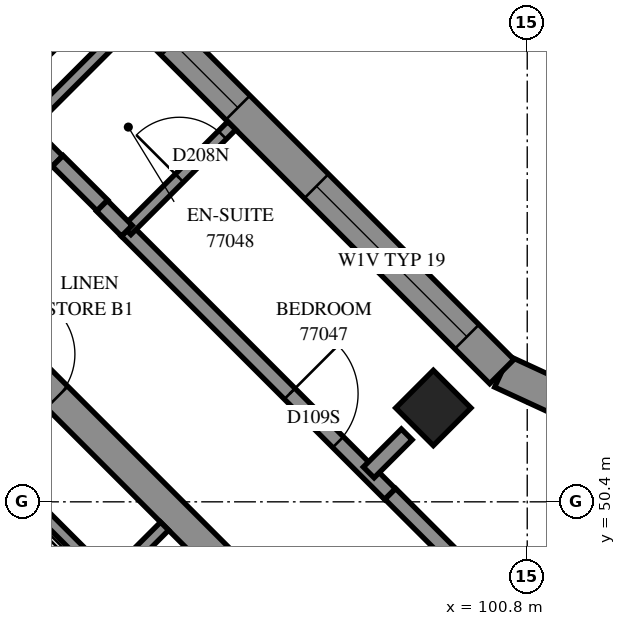
"""IFC4 building model, lengths in metres.
Left out: names, types, materials, properties, quantities, classifications, styles, units other than length and angle.
Written with IfcOpenShell. Run it as: python <this file> out.ifc"""

import sys

from ifc_helpers import new_model, si_unit, direction, frame, frame_2d, origin, origin_2d, place, context, subcontext, project, spatial, polyline, rectangle, outline, extrude, element, fill, save


model = new_model("IFC4")
c1 = context("Model", 3, precision=1e-05, world=origin(), true_north=direction((0.0, 1.0)))
c2 = subcontext(c1, "Body", "Model", "MODEL_VIEW")
j1 = project(units=[si_unit("LENGTHUNIT", "METRE"), si_unit("PLANEANGLEUNIT", "RADIAN")], contexts=[c1])
p1 = place(None, origin())
s1 = spatial("IfcSite", under=j1, at=p1, CompositionType="ELEMENT")
p2 = place(p1, origin())
s2 = spatial("IfcBuilding", under=s1, at=p2, CompositionType="ELEMENT")
p3 = place(p2, frame((0.0, 0.0, 281.2)))
s3 = spatial("IfcBuildingStorey", under=s2, at=p3, CompositionType="ELEMENT", Elevation=281.2)
for number, where, z_axis, x_axis in (
    (1, (94.474, 56.727, 0.0), (0.0, 0.0, 1.0), (0.707, -0.707, 0.0)),
    (2, (99.565, 51.635, 0.0), (0.0, 0.0, 1.0), (0.707, -0.707, 0.0)),
):
    element("IfcColumn", number, at=place(p3, frame(where, z_axis=z_axis, x_axis=x_axis)), inside=s3, PredefinedType="COLUMN", context=c2, shape_type="SweptSolid", body=[
        extrude(rectangle(XDim=0.7, YDim=0.7, at=origin_2d()), origin(), (0.0, 0.0, 1.0), 3.1),
    ])
p4 = place(p3, frame((86.695, 59.696, -0.3), z_axis=(0.0, 0.0, 1.0), x_axis=(0.7071100706, -0.7071034917, 0.0)))
e3 = element("IfcWall", 3, at=p4, inside=s3, PredefinedType="SHEAR", context=c2, shape_type="SweptSolid", body=[
    extrude(rectangle(XDim=15.2, YDim=0.4, at=frame_2d((7.6, 0.0))), origin(), (0.0, 0.0, 1.0), 2.7),
])
p5 = place(p4, frame((10.4, 0.0, 0.3)))
e4 = element("IfcOpeningElement", 4, at=p5, cuts=e3, PredefinedType="OPENING", context=c2, shape_type="SweptSolid", body=[
    extrude(rectangle(XDim=0.8, YDim=2.1, at=frame_2d((0.4, 1.05))), frame((0.0, 0.21, 0.0), z_axis=(0.0, -1.0, 0.0), x_axis=(1.0, 0.0, 0.0)), (0.0, 0.0, 1.0), 0.42),
])
p6 = place(p3, frame((99.246, 46.544, 0.0), z_axis=(0.0, 0.0, 1.0), x_axis=(0.7071067812, 0.7071067812, 0.0)))
e5 = element("IfcWall", 5, at=p6, inside=s3, PredefinedType="SOLIDWALL", context=c2, shape_type="SweptSolid", body=[
    extrude(outline(polyline([(0.225, -0.225), (6.255, -0.225), (5.61, 0.225), (-0.225, 0.225), (0.225, -0.225)])), origin(), (0.0, 0.0, 1.0), 3.1),
])
p7 = place(p6, frame((0.713, 0.0, 0.6)))
e6 = element("IfcOpeningElement", 6, at=p7, cuts=e5, PredefinedType="OPENING", context=c2, shape_type="SweptSolid", body=[
    extrude(rectangle(XDim=1.8, YDim=1.9, at=frame_2d((0.9, 0.95))), frame((0.0, 0.235, 0.0), z_axis=(0.0, -1.0, 0.0), x_axis=(1.0, 0.0, 0.0)), (0.0, 0.0, 1.0), 0.47),
])
p8 = place(p6, frame((4.017, 0.0, 0.6)))
e7 = element("IfcOpeningElement", 7, at=p8, cuts=e5, PredefinedType="OPENING", context=c2, shape_type="SweptSolid", body=[
    extrude(rectangle(XDim=1.2, YDim=1.9, at=frame_2d((0.6, 0.95))), frame((0.0, 0.235, 0.0), z_axis=(0.0, -1.0, 0.0), x_axis=(1.0, 0.0, 0.0)), (0.0, 0.0, 1.0), 0.47),
])
p9 = place(p3, frame((103.441, 50.739, 0.0), z_axis=(0.0, 0.0, 1.0), x_axis=(-0.9078548817, 0.419284526, 0.0)))
e8 = element("IfcWall", 8, at=p9, inside=s3, PredefinedType="SOLIDWALL", context=c2, shape_type="SweptSolid", body=[
    extrude(outline(polyline([(-0.323, -0.225), (3.238, -0.225), (3.318, 0.225), (0.323, 0.225), (-0.323, -0.225)])), origin(), (0.0, 0.0, 1.0), 3.1),
])
p10 = place(p9, frame((1.2, 0.0, 0.45)))
e9 = element("IfcOpeningElement", 9, at=p10, cuts=e8, PredefinedType="OPENING", context=c2, shape_type="SweptSolid", body=[
    extrude(rectangle(XDim=1.2, YDim=2.55, at=frame_2d((0.6, 1.275))), frame((0.0, 0.235, 0.0), z_axis=(0.0, -1.0, 0.0), x_axis=(1.0, 0.0, 0.0)), (0.0, 0.0, 1.0), 0.47),
])
p11 = place(p3, frame((100.466, 52.113, 0.0), z_axis=(0.0, 0.0, 1.0), x_axis=(-0.7071067812, 0.7071067812, 0.0)))
e10 = element("IfcWall", 10, at=p11, inside=s3, PredefinedType="SOLIDWALL", context=c2, shape_type="SweptSolid", body=[
    extrude(outline(polyline([(0.04, -0.225), (6.722, -0.225), (6.722, 0.225), (-0.04, 0.225), (0.04, -0.225)])), origin(), (0.0, 0.0, 1.0), 3.1),
])
p12 = place(p11, frame((0.649, 0.0, 0.45)))
e11 = element("IfcOpeningElement", 11, at=p12, cuts=e10, PredefinedType="OPENING", context=c2, shape_type="SweptSolid", body=[
    extrude(rectangle(XDim=2.8, YDim=2.55, at=frame_2d((1.4, 1.275))), frame((0.0, 0.235, 0.0), z_axis=(0.0, -1.0, 0.0), x_axis=(1.0, 0.0, 0.0)), (0.0, 0.0, 1.0), 0.47),
])
p13 = place(p11, frame((4.911, 0.0, 0.45)))
e12 = element("IfcOpeningElement", 12, at=p13, cuts=e10, PredefinedType="OPENING", context=c2, shape_type="SweptSolid", body=[
    extrude(rectangle(XDim=1.2, YDim=2.55, at=frame_2d((0.6, 1.275))), frame((0.0, 0.235, 0.0), z_axis=(0.0, -1.0, 0.0), x_axis=(1.0, 0.0, 0.0)), (0.0, 0.0, 1.0), 0.47),
])
p14 = place(p3, frame((91.313, 53.354, 0.0), z_axis=(0.0, 0.0, 1.0), x_axis=(0.7071067812, -0.7071067812, 0.0)))
e13 = element("IfcWall", 13, at=p14, inside=s3, PredefinedType="PARTITIONING", context=c2, shape_type="SweptSolid", body=[
    extrude(rectangle(XDim=5.65, YDim=0.15, at=frame_2d((2.825, 0.0))), origin(), (0.0, 0.0, 1.0), 3.1),
])
p15 = place(p3, frame((95.308, 49.358, 0.0), z_axis=(0.0, 0.0, 1.0), x_axis=(0.70705776, 0.707155799, 0.0)))
e14 = element("IfcWall", 14, at=p15, inside=s3, PredefinedType="PARTITIONING", context=c2, shape_type="SweptSolid", body=[
    extrude(rectangle(XDim=1.02, YDim=0.15, at=frame_2d((0.51, 0.0))), origin(), (0.0, 0.0, 1.0), 3.1),
])
p16 = place(p3, frame((91.077, 58.421, 0.0), z_axis=(0.0, 0.0, 1.0), x_axis=(0.7069869563, -0.7072265858, 0.0)))
e15 = element("IfcWall", 15, at=p16, inside=s3, PredefinedType="PARTITIONING", context=c2, shape_type="SweptSolid", body=[
    extrude(rectangle(XDim=5.008, YDim=0.2, at=frame_2d((2.504, 0.0))), origin(), (0.0, 0.0, 1.0), 3.1),
])
p17 = place(p16, frame((2.132, 0.0, 0.0)))
e16 = element("IfcOpeningElement", 16, at=p17, cuts=e15, PredefinedType="OPENING", context=c2, shape_type="SweptSolid", body=[
    extrude(rectangle(XDim=0.9, YDim=2.1, at=frame_2d((0.45, 1.05))), frame((0.0, 0.11, 0.0), z_axis=(0.0, -1.0, 0.0), x_axis=(1.0, 0.0, 0.0)), (0.0, 0.0, 1.0), 0.22),
])
p18 = place(p3, frame((95.531, 53.965, 0.0), z_axis=(0.0, 0.0, 1.0), x_axis=(0.7071067812, -0.7071067812, 0.0)))
e17 = element("IfcWall", 17, at=p18, inside=s3, PredefinedType="PARTITIONING", context=c2, shape_type="SweptSolid", body=[
    extrude(rectangle(XDim=4.899, YDim=0.2, at=frame_2d((2.449, 0.0))), origin(), (0.0, 0.0, 1.0), 3.1),
])
p19 = place(p18, frame((3.031, 0.0, 0.0)))
e18 = element("IfcOpeningElement", 18, at=p19, cuts=e17, PredefinedType="OPENING", context=c2, shape_type="SweptSolid", body=[
    extrude(rectangle(XDim=0.9, YDim=2.1, at=frame_2d((0.45, 1.05))), frame((0.0, 0.11, 0.0), z_axis=(0.0, -1.0, 0.0), x_axis=(1.0, 0.0, 0.0)), (0.0, 0.0, 1.0), 0.22),
])
p20 = place(p3, frame((98.998, 50.504, 0.0), z_axis=(0.0, 0.0, 1.0), x_axis=(0.7076063266, -0.7066068826, 0.0)))
e19 = element("IfcWall", 19, at=p20, inside=s3, PredefinedType="PARTITIONING", context=c2, shape_type="SweptSolid", body=[
    extrude(rectangle(XDim=2.001, YDim=0.2, at=frame_2d((1.001, 0.0))), origin(), (0.0, 0.0, 1.0), 3.1),
])
p21 = place(p3, frame((94.189, 55.313, 0.0), z_axis=(0.0, 0.0, 1.0), x_axis=(0.7070811488, 0.7071324126, 0.0)))
e20 = element("IfcWall", 20, at=p21, inside=s3, PredefinedType="PARTITIONING", context=c2, shape_type="SweptSolid", body=[
    extrude(rectangle(XDim=1.951, YDim=0.15, at=frame_2d((0.975, 0.0))), origin(), (0.0, 0.0, 1.0), 3.1),
])
p22 = place(p3, frame((95.533, 53.969, 0.0), z_axis=(0.0, 0.0, 1.0), x_axis=(0.7070811488, 0.7071324126, 0.0)))
e21 = element("IfcWall", 21, at=p22, inside=s3, PredefinedType="PARTITIONING", context=c2, shape_type="SweptSolid", body=[
    extrude(rectangle(XDim=1.951, YDim=0.15, at=frame_2d((0.975, 0.0))), origin(), (0.0, 0.0, 1.0), 3.1),
])
p23 = place(p22, frame((0.976, 0.0, 0.0)))
e22 = element("IfcOpeningElement", 22, at=p23, cuts=e21, PredefinedType="OPENING", context=c2, shape_type="SweptSolid", body=[
    extrude(rectangle(XDim=0.8, YDim=2.1, at=frame_2d((0.4, 1.05))), frame((0.0, 0.085, 0.0), z_axis=(0.0, -1.0, 0.0), x_axis=(1.0, 0.0, 0.0)), (0.0, 0.0, 1.0), 0.17),
])
p24 = place(p3, frame((94.623, 54.885, 0.0), z_axis=(0.0, 0.0, 1.0), x_axis=(0.7083103646, -0.7059011457, 0.0)))
e23 = element("IfcWall", 23, at=p24, inside=s3, PredefinedType="PARTITIONING", context=c2, shape_type="SweptSolid", body=[
    extrude(rectangle(XDim=0.83, YDim=0.2, at=frame_2d((0.415, 0.0))), origin(), (0.0, 0.0, 1.0), 3.1),
])
p25 = place(p3, frame((98.715, 50.787, 0.0), z_axis=(0.0, 0.0, 1.0), x_axis=(0.7071067812, 0.7071067812, 0.0)))
e24 = element("IfcWall", 24, at=p25, inside=s3, PredefinedType="PARTITIONING", context=c2, shape_type="SweptSolid", body=[
    extrude(rectangle(XDim=0.707, YDim=0.2, at=frame_2d((0.353, 0.0))), origin(), (0.0, 0.0, 1.0), 3.1),
])
p26 = place(p3, frame((95.206, 54.294, 0.0), z_axis=(0.0, 0.0, 1.0), x_axis=(0.7049410788, -0.7092658707, 0.0)))
e25 = element("IfcWall", 25, at=p26, inside=s3, PredefinedType="PARTITIONING", context=c2, shape_type="SweptSolid", body=[
    extrude(rectangle(XDim=0.462, YDim=0.2, at=frame_2d((0.231, 0.0))), origin(), (0.0, 0.0, 1.0), 3.1),
])
p27 = place(p12, origin())
e26 = element("IfcWindow", 26, at=p27, inside=s3, PartitioningType="SINGLE_PANEL", PredefinedType="WINDOW", context=c2, shape_type="SweptSolid", body=[
    extrude(rectangle(XDim=2.8, YDim=2.55, at=frame_2d((1.4, 1.275))), frame((0.0, 0.205, 0.0), z_axis=(0.0, -1.0, 0.0), x_axis=(1.0, 0.0, 0.0)), (0.0, 0.0, 1.0), 0.06),
])
fill(e11, e26)
p28 = place(p13, origin())
e27 = element("IfcWindow", 27, at=p28, inside=s3, PartitioningType="SINGLE_PANEL", PredefinedType="WINDOW", context=c2, shape_type="SweptSolid", body=[
    extrude(rectangle(XDim=1.2, YDim=2.55, at=frame_2d((0.6, 1.275))), frame((0.0, 0.205, 0.0), z_axis=(0.0, -1.0, 0.0), x_axis=(1.0, 0.0, 0.0)), (0.0, 0.0, 1.0), 0.06),
])
fill(e12, e27)
p29 = place(p5, origin())
e28 = element("IfcDoor", 28, at=p29, inside=s3, OperationType="SINGLE_SWING_RIGHT", PredefinedType="DOOR", context=c2, shape_type="SweptSolid", body=[
    extrude(rectangle(XDim=0.8, YDim=2.1, at=frame_2d((0.4, 1.05))), frame((0.0, 0.025, 0.0), z_axis=(0.0, -1.0, 0.0), x_axis=(1.0, 0.0, 0.0)), (0.0, 0.0, 1.0), 0.05),
])
fill(e4, e28)
p30 = place(p19, origin())
e29 = element("IfcDoor", 29, at=p30, inside=s3, OperationType="SINGLE_SWING_LEFT", PredefinedType="DOOR", context=c2, shape_type="SweptSolid", body=[
    extrude(rectangle(XDim=0.9, YDim=2.1, at=frame_2d((0.45, 1.05))), frame((0.0, 0.025, 0.0), z_axis=(0.0, -1.0, 0.0), x_axis=(1.0, 0.0, 0.0)), (0.0, 0.0, 1.0), 0.05),
])
fill(e18, e29)
p31 = place(p23, origin())
e30 = element("IfcDoor", 30, at=p31, inside=s3, OperationType="SINGLE_SWING_RIGHT", PredefinedType="DOOR", context=c2, shape_type="SweptSolid", body=[
    extrude(rectangle(XDim=0.8, YDim=2.1, at=frame_2d((0.4, 1.05))), frame((0.0, 0.025, 0.0), z_axis=(0.0, -1.0, 0.0), x_axis=(1.0, 0.0, 0.0)), (0.0, 0.0, 1.0), 0.05),
])
fill(e22, e30)
save(model, sys.argv[1])
